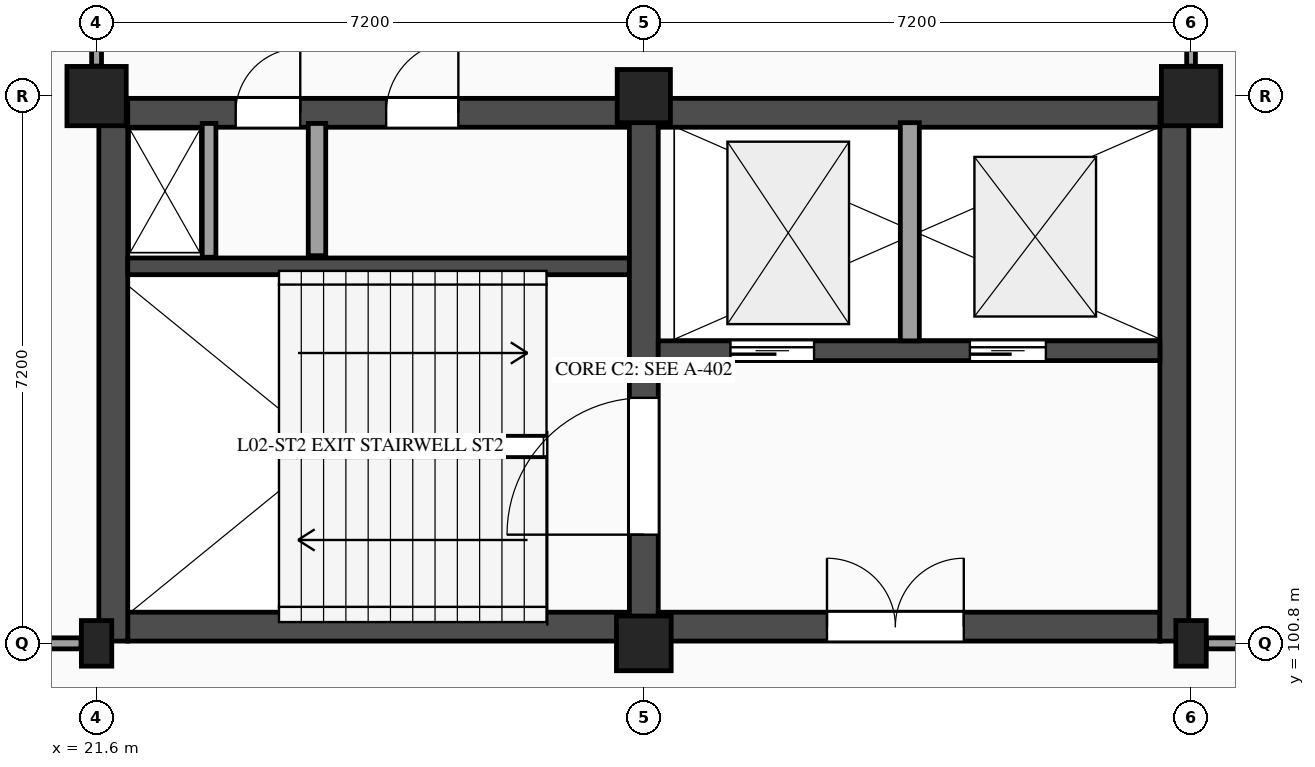
"""IFC4 building model, lengths in metres.
Left out: names, types, materials, properties, quantities, classifications, styles, units other than length and angle.
Written with IfcOpenShell. Run it as: python <this file> out.ifc"""

import sys

from ifc_helpers import new_model, si_unit, direction, frame, frame_2d, origin, origin_2d, place, context, subcontext, project, spatial, rectangle, extrude, element, fill, save


model = new_model("IFC4")
c1 = context("Model", 3, precision=1e-05, world=origin(), true_north=direction((0.0, 1.0)))
c2 = subcontext(c1, "Body", "Model", "MODEL_VIEW")
j1 = project(units=[si_unit("LENGTHUNIT", "METRE"), si_unit("PLANEANGLEUNIT", "RADIAN")], contexts=[c1])
p1 = place(None, origin())
s1 = spatial("IfcSite", under=j1, at=p1, CompositionType="ELEMENT")
p2 = place(p1, origin())
s2 = spatial("IfcBuilding", under=s1, at=p2, CompositionType="ELEMENT")
p3 = place(p2, frame((0.0, 0.0, 9.9)))
s3 = spatial("IfcBuildingStorey", under=s2, at=p3, CompositionType="ELEMENT", Elevation=9.9)
p4 = place(p3, frame((21.6, 100.8, 0.0), z_axis=(0.0, 0.0, 1.0), x_axis=(1.0, 0.0, 0.0)))
e1 = element("IfcColumn", 1, at=p4, inside=s3, PredefinedType="PILASTER", context=c2, shape_type="SweptSolid", body=[
    extrude(rectangle(XDim=0.4, YDim=0.6, at=origin_2d()), origin(), (0.0, 0.0, 1.0), 4.5),
])
p5 = place(p3, frame((21.6, 108.0, 0.0), z_axis=(0.0, 0.0, 1.0), x_axis=(1.0, 0.0, 0.0)))
e2 = element("IfcColumn", 2, at=p5, inside=s3, PredefinedType="COLUMN", context=c2, shape_type="SweptSolid", body=[
    extrude(rectangle(XDim=0.78, YDim=0.78, at=origin_2d()), origin(), (0.0, 0.0, 1.0), 4.5),
])
p6 = place(p3, frame((28.8, 100.8, 0.0), z_axis=(0.0, 0.0, 1.0), x_axis=(1.0, 0.0, 0.0)))
e3 = element("IfcColumn", 3, at=p6, inside=s3, PredefinedType="COLUMN", context=c2, shape_type="SweptSolid", body=[
    extrude(rectangle(XDim=0.72, YDim=0.72, at=origin_2d()), origin(), (0.0, 0.0, 1.0), 4.5),
])
p7 = place(p3, frame((28.8, 108.0, 0.0), z_axis=(0.0, 0.0, 1.0), x_axis=(1.0, 0.0, 0.0)))
e4 = element("IfcColumn", 4, at=p7, inside=s3, PredefinedType="COLUMN", context=c2, shape_type="SweptSolid", body=[
    extrude(rectangle(XDim=0.7, YDim=0.7, at=origin_2d()), origin(), (0.0, 0.0, 1.0), 4.5),
])
p8 = place(p3, frame((36.0, 100.8, 0.0), z_axis=(0.0, 0.0, 1.0), x_axis=(1.0, 0.0, 0.0)))
e5 = element("IfcColumn", 5, at=p8, inside=s3, PredefinedType="PILASTER", context=c2, shape_type="SweptSolid", body=[
    extrude(rectangle(XDim=0.4, YDim=0.6, at=origin_2d()), origin(), (0.0, 0.0, 1.0), 4.5),
])
p9 = place(p3, frame((36.0, 108.0, 0.0), z_axis=(0.0, 0.0, 1.0), x_axis=(1.0, 0.0, 0.0)))
e6 = element("IfcColumn", 6, at=p9, inside=s3, PredefinedType="COLUMN", context=c2, shape_type="SweptSolid", body=[
    extrude(rectangle(XDim=0.78, YDim=0.78, at=origin_2d()), origin(), (0.0, 0.0, 1.0), 4.5),
])
p10 = place(p3, frame((22.01, 101.02, 0.0), z_axis=(0.0, 0.0, 1.0), x_axis=(1.0, 0.0, 0.0)))
e7 = element("IfcWall", 7, at=p10, inside=s3, PredefinedType="SHEAR", context=c2, shape_type="SweptSolid", body=[
    extrude(rectangle(XDim=6.6, YDim=0.38, at=frame_2d((3.3, 0.0))), origin(), (0.0, 0.0, 1.0), 4.225),
])
p11 = place(p3, frame((21.82, 107.97, 0.0), z_axis=(0.0, 0.0, 1.0), x_axis=(0.0, -1.0, 0.0)))
e8 = element("IfcWall", 8, at=p11, inside=s3, PredefinedType="SHEAR", context=c2, shape_type="SweptSolid", body=[
    extrude(rectangle(XDim=7.14, YDim=0.38, at=frame_2d((3.57, 0.0))), origin(), (0.0, 0.0, 1.0), 4.225),
])
p12 = place(p3, frame((22.01, 107.78, 0.0), z_axis=(0.0, 0.0, 1.0), x_axis=(1.0, 0.0, 0.0)))
e9 = element("IfcWall", 9, at=p12, inside=s3, PredefinedType="SHEAR", context=c2, shape_type="SweptSolid", body=[
    extrude(rectangle(XDim=6.6, YDim=0.38, at=frame_2d((3.3, 0.0))), origin(), (0.0, 0.0, 1.0), 4.225),
])
p13 = place(p12, frame((1.42, 0.0, 0.0)))
e10 = element("IfcOpeningElement", 10, at=p13, cuts=e9, PredefinedType="OPENING", context=c2, shape_type="SweptSolid", body=[
    extrude(rectangle(XDim=0.85, YDim=2.1, at=frame_2d((0.425, 1.05))), frame((0.0, 0.2, 0.0), z_axis=(0.0, -1.0, 0.0), x_axis=(1.0, 0.0, 0.0)), (0.0, 0.0, 1.0), 0.4),
])
p14 = place(p12, frame((3.4, 0.0, 0.0)))
e11 = element("IfcOpeningElement", 11, at=p14, cuts=e9, PredefinedType="OPENING", context=c2, shape_type="SweptSolid", body=[
    extrude(rectangle(XDim=0.95, YDim=2.15, at=frame_2d((0.475, 1.075))), frame((0.0, 0.2, 0.0), z_axis=(0.0, -1.0, 0.0), x_axis=(1.0, 0.0, 0.0)), (0.0, 0.0, 1.0), 0.4),
])
p15 = place(p3, frame((22.01, 105.76, 0.0), z_axis=(0.0, 0.0, 1.0), x_axis=(1.0, 0.0, 0.0)))
e12 = element("IfcWall", 12, at=p15, inside=s3, PredefinedType="SHEAR", context=c2, shape_type="SweptSolid", body=[
    extrude(rectangle(XDim=6.6, YDim=0.22, at=frame_2d((3.3, 0.0))), origin(), (0.0, 0.0, 1.0), 4.225),
])
p16 = place(p3, frame((24.5, 105.9, 0.0), z_axis=(0.0, 0.0, 1.0), x_axis=(0.0, 1.0, 0.0)))
e13 = element("IfcWall", 13, at=p16, inside=s3, PredefinedType="PARTITIONING", context=c2, shape_type="SweptSolid", body=[
    extrude(rectangle(XDim=1.74, YDim=0.23, at=frame_2d((0.87, 0.0))), origin(), (0.0, 0.0, 1.0), 4.225),
])
p17 = place(p3, frame((23.08, 105.88, 0.0), z_axis=(0.0, 0.0, 1.0), x_axis=(0.0, 1.0, 0.0)))
e14 = element("IfcWall", 14, at=p17, inside=s3, PredefinedType="PARTITIONING", context=c2, shape_type="SweptSolid", body=[
    extrude(rectangle(XDim=1.76, YDim=0.18, at=frame_2d((0.88, 0.0))), origin(), (0.0, 0.0, 1.0), 4.225),
])
p18 = place(p3, frame((28.8, 100.83, 0.0), z_axis=(0.0, 0.0, 1.0), x_axis=(0.0, 1.0, 0.0)))
e15 = element("IfcWall", 15, at=p18, inside=s3, PredefinedType="SHEAR", context=c2, shape_type="SweptSolid", body=[
    extrude(rectangle(XDim=7.14, YDim=0.38, at=frame_2d((3.57, 0.0))), origin(), (0.0, 0.0, 1.0), 4.225),
])
p19 = place(p18, frame((1.4, 0.0, 0.0)))
e16 = element("IfcOpeningElement", 16, at=p19, cuts=e15, PredefinedType="OPENING", context=c2, shape_type="SweptSolid", body=[
    extrude(rectangle(XDim=1.8, YDim=2.2, at=frame_2d((0.9, 1.1))), frame((0.0, 0.2, 0.0), z_axis=(0.0, -1.0, 0.0), x_axis=(1.0, 0.0, 0.0)), (0.0, 0.0, 1.0), 0.4),
])
p20 = place(p3, frame((28.99, 101.02, 0.0), z_axis=(0.0, 0.0, 1.0), x_axis=(1.0, 0.0, 0.0)))
e17 = element("IfcWall", 17, at=p20, inside=s3, PredefinedType="SHEAR", context=c2, shape_type="SweptSolid", body=[
    extrude(rectangle(XDim=6.6, YDim=0.38, at=frame_2d((3.3, 0.0))), origin(), (0.0, 0.0, 1.0), 4.225),
])
p21 = place(p20, frame((2.22, 0.0, 0.0)))
e18 = element("IfcOpeningElement", 18, at=p21, cuts=e17, PredefinedType="OPENING", context=c2, shape_type="SweptSolid", body=[
    extrude(rectangle(XDim=1.8, YDim=2.2, at=frame_2d((0.9, 1.1))), frame((0.0, 0.2, 0.0), z_axis=(0.0, -1.0, 0.0), x_axis=(1.0, 0.0, 0.0)), (0.0, 0.0, 1.0), 0.4),
])
p22 = place(p3, frame((35.78, 100.83, 0.0), z_axis=(0.0, 0.0, 1.0), x_axis=(0.0, 1.0, 0.0)))
e19 = element("IfcWall", 19, at=p22, inside=s3, PredefinedType="SHEAR", context=c2, shape_type="SweptSolid", body=[
    extrude(rectangle(XDim=7.14, YDim=0.38, at=frame_2d((3.57, 0.0))), origin(), (0.0, 0.0, 1.0), 4.225),
])
p23 = place(p3, frame((28.99, 107.78, 0.0), z_axis=(0.0, 0.0, 1.0), x_axis=(1.0, 0.0, 0.0)))
e20 = element("IfcWall", 20, at=p23, inside=s3, PredefinedType="SHEAR", context=c2, shape_type="SweptSolid", body=[
    extrude(rectangle(XDim=6.6, YDim=0.38, at=frame_2d((3.3, 0.0))), origin(), (0.0, 0.0, 1.0), 4.225),
])
p24 = place(p3, frame((28.99, 104.65, 0.0), z_axis=(0.0, 0.0, 1.0), x_axis=(1.0, 0.0, 0.0)))
e21 = element("IfcWall", 21, at=p24, inside=s3, PredefinedType="SHEAR", context=c2, shape_type="SweptSolid", body=[
    extrude(rectangle(XDim=6.6, YDim=0.26, at=frame_2d((3.3, 0.0))), origin(), (0.0, 0.0, 1.0), 4.225),
])
p25 = place(p24, frame((0.95, 0.0, 0.0)))
e22 = element("IfcOpeningElement", 22, at=p25, cuts=e21, PredefinedType="OPENING", context=c2, shape_type="SweptSolid", body=[
    extrude(rectangle(XDim=1.1, YDim=2.2, at=frame_2d((0.55, 1.1))), frame((0.0, 0.14, 0.0), z_axis=(0.0, -1.0, 0.0), x_axis=(1.0, 0.0, 0.0)), (0.0, 0.0, 1.0), 0.28),
])
p26 = place(p24, frame((4.1, 0.0, 0.0)))
e23 = element("IfcOpeningElement", 23, at=p26, cuts=e21, PredefinedType="OPENING", context=c2, shape_type="SweptSolid", body=[
    extrude(rectangle(XDim=1.0, YDim=2.15, at=frame_2d((0.5, 1.075))), frame((0.0, 0.14, 0.0), z_axis=(0.0, -1.0, 0.0), x_axis=(1.0, 0.0, 0.0)), (0.0, 0.0, 1.0), 0.28),
])
p27 = place(p3, frame((32.3, 104.78, 0.0), z_axis=(0.0, 0.0, 1.0), x_axis=(0.0, 1.0, 0.0)))
e24 = element("IfcWall", 24, at=p27, inside=s3, PredefinedType="PARTITIONING", context=c2, shape_type="SweptSolid", body=[
    extrude(rectangle(XDim=2.87, YDim=0.25, at=frame_2d((1.435, 0.0))), origin(), (0.0, 0.0, 1.0), 4.225),
])
p28 = place(p3, frame((14.765, 100.8, 0.0), z_axis=(0.0, 0.0, 1.0), x_axis=(1.0, 0.0, 0.0)))
e25 = element("IfcWall", 25, at=p28, inside=s3, PredefinedType="PARTITIONING", context=c2, shape_type="SweptSolid", body=[
    extrude(rectangle(XDim=6.63, YDim=0.145, at=frame_2d((3.315, 0.0))), origin(), (0.0, 0.0, 1.0), 3.505),
])
p29 = place(p3, frame((21.6, 108.395, 0.0), z_axis=(0.0, 0.0, 1.0), x_axis=(0.0, 1.0, 0.0)))
e26 = element("IfcWall", 26, at=p29, inside=s3, PredefinedType="PARTITIONING", context=c2, shape_type="SweptSolid", body=[
    extrude(rectangle(XDim=6.425, YDim=0.13, at=frame_2d((3.212, 0.0))), origin(), (0.0, 0.0, 1.0), 3.535),
])
p30 = place(p29, frame((2.413, 0.0, 0.0)))
e27 = element("IfcOpeningElement", 27, at=p30, cuts=e26, PredefinedType="OPENING", context=c2, shape_type="SweptSolid", body=[
    extrude(rectangle(XDim=1.6, YDim=2.2, at=frame_2d((0.8, 1.1))), frame((0.0, 0.075, 0.0), z_axis=(0.0, -1.0, 0.0), x_axis=(1.0, 0.0, 0.0)), (0.0, 0.0, 1.0), 0.15),
])
p31 = place(p3, frame((36.0, 108.395, 0.0), z_axis=(0.0, 0.0, 1.0), x_axis=(0.0, 1.0, 0.0)))
e28 = element("IfcWall", 28, at=p31, inside=s3, PredefinedType="PARTITIONING", context=c2, shape_type="SweptSolid", body=[
    extrude(rectangle(XDim=6.425, YDim=0.115, at=frame_2d((3.212, 0.0))), origin(), (0.0, 0.0, 1.0), 3.535),
])
p32 = place(p31, frame((2.433, 0.0, 0.0)))
e29 = element("IfcOpeningElement", 29, at=p32, cuts=e28, PredefinedType="OPENING", context=c2, shape_type="SweptSolid", body=[
    extrude(rectangle(XDim=1.56, YDim=2.25, at=frame_2d((0.78, 1.125))), frame((0.0, 0.067, 0.0), z_axis=(0.0, -1.0, 0.0), x_axis=(1.0, 0.0, 0.0)), (0.0, 0.0, 1.0), 0.135),
])
p33 = place(p3, frame((36.205, 100.8, 0.0), z_axis=(0.0, 0.0, 1.0), x_axis=(1.0, 0.0, 0.0)))
e30 = element("IfcWall", 30, at=p33, inside=s3, PredefinedType="PARTITIONING", context=c2, shape_type="SweptSolid", body=[
    extrude(rectangle(XDim=6.63, YDim=0.145, at=frame_2d((3.315, 0.0))), origin(), (0.0, 0.0, 1.0), 3.575),
])
p34 = place(p13, origin())
e31 = element("IfcDoor", 31, at=p34, inside=s3, OperationType="SINGLE_SWING_RIGHT", PredefinedType="DOOR", context=c2, shape_type="SweptSolid", body=[
    extrude(rectangle(XDim=0.85, YDim=2.1, at=frame_2d((0.425, 1.05))), frame((0.0, 0.025, 0.0), z_axis=(0.0, -1.0, 0.0), x_axis=(1.0, 0.0, 0.0)), (0.0, 0.0, 1.0), 0.05),
])
fill(e10, e31)
p35 = place(p19, origin())
e32 = element("IfcDoor", 32, at=p35, inside=s3, OperationType="SINGLE_SWING_LEFT", PredefinedType="DOOR", context=c2, shape_type="SweptSolid", body=[
    extrude(rectangle(XDim=1.8, YDim=2.2, at=frame_2d((0.9, 1.1))), frame((0.0, 0.025, 0.0), z_axis=(0.0, -1.0, 0.0), x_axis=(1.0, 0.0, 0.0)), (0.0, 0.0, 1.0), 0.05),
])
fill(e16, e32)
p36 = place(p14, origin())
e33 = element("IfcDoor", 33, at=p36, inside=s3, OperationType="SINGLE_SWING_RIGHT", PredefinedType="DOOR", context=c2, shape_type="SweptSolid", body=[
    extrude(rectangle(XDim=0.95, YDim=2.15, at=frame_2d((0.475, 1.075))), frame((0.0, 0.025, 0.0), z_axis=(0.0, -1.0, 0.0), x_axis=(1.0, 0.0, 0.0)), (0.0, 0.0, 1.0), 0.05),
])
fill(e11, e33)
p37 = place(p25, origin())
e34 = element("IfcDoor", 34, at=p37, inside=s3, OperationType="SLIDING_TO_LEFT", PredefinedType="DOOR", context=c2, shape_type="SweptSolid", body=[
    extrude(rectangle(XDim=1.1, YDim=2.2, at=frame_2d((0.55, 1.1))), frame((0.0, 0.025, 0.0), z_axis=(0.0, -1.0, 0.0), x_axis=(1.0, 0.0, 0.0)), (0.0, 0.0, 1.0), 0.05),
])
fill(e22, e34)
p38 = place(p26, origin())
e35 = element("IfcDoor", 35, at=p38, inside=s3, OperationType="SLIDING_TO_RIGHT", PredefinedType="DOOR", context=c2, shape_type="SweptSolid", body=[
    extrude(rectangle(XDim=1.0, YDim=2.15, at=frame_2d((0.5, 1.075))), frame((0.0, 0.025, 0.0), z_axis=(0.0, -1.0, 0.0), x_axis=(1.0, 0.0, 0.0)), (0.0, 0.0, 1.0), 0.05),
])
fill(e23, e35)
p39 = place(p21, origin())
e36 = element("IfcDoor", 36, at=p39, inside=s3, OperationType="DOUBLE_DOOR_SINGLE_SWING", PredefinedType="DOOR", context=c2, shape_type="SweptSolid", body=[
    extrude(rectangle(XDim=1.8, YDim=2.2, at=frame_2d((0.9, 1.1))), frame((0.0, 0.025, 0.0), z_axis=(0.0, -1.0, 0.0), x_axis=(1.0, 0.0, 0.0)), (0.0, 0.0, 1.0), 0.05),
])
fill(e18, e36)
save(model, sys.argv[1])
